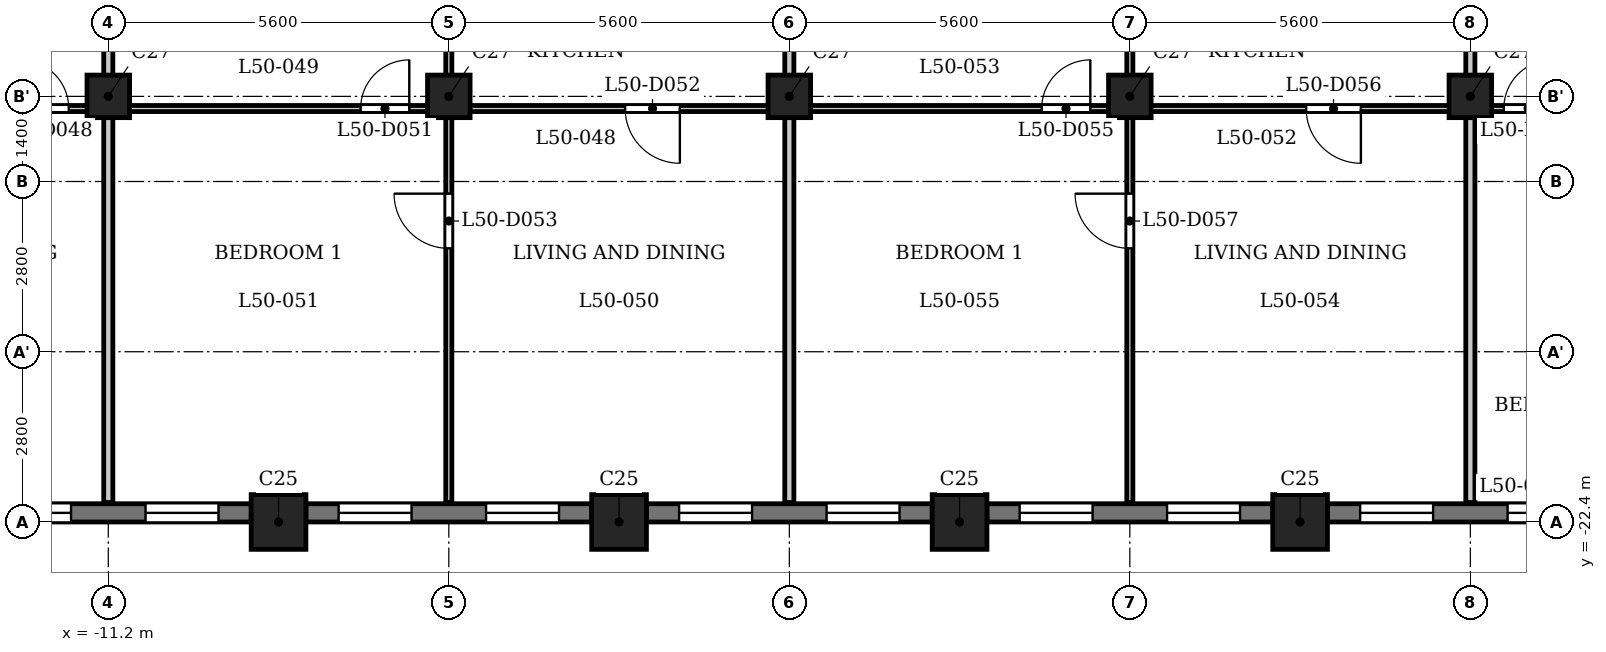
"""IFC4 building model, lengths in metres.
Left out: names, types, materials, properties, quantities, classifications, styles, units other than length and angle.
Written with IfcOpenShell. Run it as: python <this file> out.ifc"""

import sys

from ifc_helpers import new_model, si_unit, direction, frame, frame_2d, origin, origin_2d, place, context, subcontext, project, spatial, rectangle, extrude, element, fill, save


model = new_model("IFC4")
c1 = context("Model", 3, precision=1e-05, world=origin(), true_north=direction((0.0, 1.0)))
c2 = subcontext(c1, "Body", "Model", "MODEL_VIEW")
j1 = project(units=[si_unit("LENGTHUNIT", "METRE"), si_unit("PLANEANGLEUNIT", "RADIAN")], contexts=[c1])
p1 = place(None, origin())
s1 = spatial("IfcSite", under=j1, at=p1, CompositionType="ELEMENT")
p2 = place(p1, origin())
s2 = spatial("IfcBuilding", under=s1, at=p2, CompositionType="ELEMENT")
p3 = place(p2, frame((0.0, 0.0, 195.9)))
s3 = spatial("IfcBuildingStorey", under=s2, at=p3, CompositionType="ELEMENT", Elevation=195.9)
for number, where, z_axis, x_axis in (
    (1, (-8.4, -22.4, 0.0), (0.0, 0.0, 1.0), (1.0, 0.0, 0.0)),
    (2, (-2.8, -22.4, 0.0), (0.0, 0.0, 1.0), (1.0, 0.0, 0.0)),
    (3, (2.8, -22.4, 0.0), (0.0, 0.0, 1.0), (1.0, 0.0, 0.0)),
    (4, (8.4, -22.4, 0.0), (0.0, 0.0, 1.0), (1.0, 0.0, 0.0)),
):
    element("IfcColumn", number, at=place(p3, frame(where, z_axis=z_axis, x_axis=x_axis)), inside=s3, PredefinedType="COLUMN", context=c2, shape_type="SweptSolid", body=[
        extrude(rectangle(XDim=0.9, YDim=0.9, at=origin_2d()), origin(), (0.0, 0.0, 1.0), 3.5),
    ])
for number, where, z_axis, x_axis in (
    (5, (-11.2, -15.4, 0.0), (0.0, 0.0, 1.0), (1.0, 0.0, 0.0)),
    (6, (-5.6, -15.4, 0.0), (0.0, 0.0, 1.0), (1.0, 0.0, 0.0)),
    (7, (0.0, -15.4, 0.0), (0.0, 0.0, 1.0), (1.0, 0.0, 0.0)),
    (8, (5.6, -15.4, 0.0), (0.0, 0.0, 1.0), (1.0, 0.0, 0.0)),
    (9, (11.2, -15.4, 0.0), (0.0, 0.0, 1.0), (1.0, 0.0, 0.0)),
):
    element("IfcColumn", number, at=place(p3, frame(where, z_axis=z_axis, x_axis=x_axis)), inside=s3, PredefinedType="COLUMN", context=c2, shape_type="SweptSolid", body=[
        extrude(rectangle(XDim=0.7, YDim=0.7, at=origin_2d()), origin(), (0.0, 0.0, 1.0), 3.5),
    ])
p4 = place(p3, frame((-13.55, -22.25, 0.0), z_axis=(0.0, 0.0, 1.0), x_axis=(1.0, 0.0, 0.0)))
e10 = element("IfcWall", 10, at=p4, inside=s3, PredefinedType="SOLIDWALL", context=c2, shape_type="SweptSolid", body=[
    extrude(rectangle(XDim=4.7, YDim=0.3, at=frame_2d((2.35, 0.0))), origin(), (0.0, 0.0, 1.0), 2.5),
])
p5 = place(p4, frame((0.538, 0.0, 0.6)))
e11 = element("IfcOpeningElement", 11, at=p5, cuts=e10, PredefinedType="OPENING", context=c2, shape_type="SweptSolid", body=[
    extrude(rectangle(XDim=1.2, YDim=1.55, at=frame_2d((0.6, 0.775))), frame((0.0, 0.16, 0.0), z_axis=(0.0, -1.0, 0.0), x_axis=(1.0, 0.0, 0.0)), (0.0, 0.0, 1.0), 0.32),
])
p6 = place(p4, frame((2.962, 0.0, 0.6)))
e12 = element("IfcOpeningElement", 12, at=p6, cuts=e10, PredefinedType="OPENING", context=c2, shape_type="SweptSolid", body=[
    extrude(rectangle(XDim=1.2, YDim=1.55, at=frame_2d((0.6, 0.775))), frame((0.0, 0.16, 0.0), z_axis=(0.0, -1.0, 0.0), x_axis=(1.0, 0.0, 0.0)), (0.0, 0.0, 1.0), 0.32),
])
p7 = place(p3, frame((-7.95, -22.25, 0.0), z_axis=(0.0, 0.0, 1.0), x_axis=(1.0, 0.0, 0.0)))
e13 = element("IfcWall", 13, at=p7, inside=s3, PredefinedType="SOLIDWALL", context=c2, shape_type="SweptSolid", body=[
    extrude(rectangle(XDim=4.7, YDim=0.3, at=frame_2d((2.35, 0.0))), origin(), (0.0, 0.0, 1.0), 2.5),
])
p8 = place(p7, frame((0.538, 0.0, 0.6)))
e14 = element("IfcOpeningElement", 14, at=p8, cuts=e13, PredefinedType="OPENING", context=c2, shape_type="SweptSolid", body=[
    extrude(rectangle(XDim=1.2, YDim=1.55, at=frame_2d((0.6, 0.775))), frame((0.0, 0.16, 0.0), z_axis=(0.0, -1.0, 0.0), x_axis=(1.0, 0.0, 0.0)), (0.0, 0.0, 1.0), 0.32),
])
p9 = place(p7, frame((2.962, 0.0, 0.6)))
e15 = element("IfcOpeningElement", 15, at=p9, cuts=e13, PredefinedType="OPENING", context=c2, shape_type="SweptSolid", body=[
    extrude(rectangle(XDim=1.2, YDim=1.55, at=frame_2d((0.6, 0.775))), frame((0.0, 0.16, 0.0), z_axis=(0.0, -1.0, 0.0), x_axis=(1.0, 0.0, 0.0)), (0.0, 0.0, 1.0), 0.32),
])
p10 = place(p3, frame((-2.35, -22.25, 0.0), z_axis=(0.0, 0.0, 1.0), x_axis=(1.0, 0.0, 0.0)))
e16 = element("IfcWall", 16, at=p10, inside=s3, PredefinedType="SOLIDWALL", context=c2, shape_type="SweptSolid", body=[
    extrude(rectangle(XDim=4.7, YDim=0.3, at=frame_2d((2.35, 0.0))), origin(), (0.0, 0.0, 1.0), 2.5),
])
p11 = place(p10, frame((0.538, 0.0, 0.6)))
e17 = element("IfcOpeningElement", 17, at=p11, cuts=e16, PredefinedType="OPENING", context=c2, shape_type="SweptSolid", body=[
    extrude(rectangle(XDim=1.2, YDim=1.55, at=frame_2d((0.6, 0.775))), frame((0.0, 0.16, 0.0), z_axis=(0.0, -1.0, 0.0), x_axis=(1.0, 0.0, 0.0)), (0.0, 0.0, 1.0), 0.32),
])
p12 = place(p10, frame((2.962, 0.0, 0.6)))
e18 = element("IfcOpeningElement", 18, at=p12, cuts=e16, PredefinedType="OPENING", context=c2, shape_type="SweptSolid", body=[
    extrude(rectangle(XDim=1.2, YDim=1.55, at=frame_2d((0.6, 0.775))), frame((0.0, 0.16, 0.0), z_axis=(0.0, -1.0, 0.0), x_axis=(1.0, 0.0, 0.0)), (0.0, 0.0, 1.0), 0.32),
])
p13 = place(p3, frame((3.25, -22.25, 0.0), z_axis=(0.0, 0.0, 1.0), x_axis=(1.0, 0.0, 0.0)))
e19 = element("IfcWall", 19, at=p13, inside=s3, PredefinedType="SOLIDWALL", context=c2, shape_type="SweptSolid", body=[
    extrude(rectangle(XDim=4.7, YDim=0.3, at=frame_2d((2.35, 0.0))), origin(), (0.0, 0.0, 1.0), 2.5),
])
p14 = place(p13, frame((0.538, 0.0, 0.6)))
e20 = element("IfcOpeningElement", 20, at=p14, cuts=e19, PredefinedType="OPENING", context=c2, shape_type="SweptSolid", body=[
    extrude(rectangle(XDim=1.2, YDim=1.55, at=frame_2d((0.6, 0.775))), frame((0.0, 0.16, 0.0), z_axis=(0.0, -1.0, 0.0), x_axis=(1.0, 0.0, 0.0)), (0.0, 0.0, 1.0), 0.32),
])
p15 = place(p13, frame((2.962, 0.0, 0.6)))
e21 = element("IfcOpeningElement", 21, at=p15, cuts=e19, PredefinedType="OPENING", context=c2, shape_type="SweptSolid", body=[
    extrude(rectangle(XDim=1.2, YDim=1.55, at=frame_2d((0.6, 0.775))), frame((0.0, 0.16, 0.0), z_axis=(0.0, -1.0, 0.0), x_axis=(1.0, 0.0, 0.0)), (0.0, 0.0, 1.0), 0.32),
])
p16 = place(p3, frame((8.85, -22.25, 0.0), z_axis=(0.0, 0.0, 1.0), x_axis=(1.0, 0.0, 0.0)))
e22 = element("IfcWall", 22, at=p16, inside=s3, PredefinedType="SOLIDWALL", context=c2, shape_type="SweptSolid", body=[
    extrude(rectangle(XDim=4.7, YDim=0.3, at=frame_2d((2.35, 0.0))), origin(), (0.0, 0.0, 1.0), 2.5),
])
p17 = place(p16, frame((0.538, 0.0, 0.6)))
e23 = element("IfcOpeningElement", 23, at=p17, cuts=e22, PredefinedType="OPENING", context=c2, shape_type="SweptSolid", body=[
    extrude(rectangle(XDim=1.2, YDim=1.55, at=frame_2d((0.6, 0.775))), frame((0.0, 0.16, 0.0), z_axis=(0.0, -1.0, 0.0), x_axis=(1.0, 0.0, 0.0)), (0.0, 0.0, 1.0), 0.32),
])
p18 = place(p16, frame((2.962, 0.0, 0.6)))
e24 = element("IfcOpeningElement", 24, at=p18, cuts=e22, PredefinedType="OPENING", context=c2, shape_type="SweptSolid", body=[
    extrude(rectangle(XDim=1.2, YDim=1.55, at=frame_2d((0.6, 0.775))), frame((0.0, 0.16, 0.0), z_axis=(0.0, -1.0, 0.0), x_axis=(1.0, 0.0, 0.0)), (0.0, 0.0, 1.0), 0.32),
])
p19 = place(p3, frame((-16.725, -15.6, 0.0), z_axis=(0.0, 0.0, 1.0), x_axis=(1.0, 0.0, 0.0)))
e25 = element("IfcWall", 25, at=p19, inside=s3, PredefinedType="PARTITIONING", context=c2, shape_type="SweptSolid", body=[
    extrude(rectangle(XDim=33.45, YDim=0.1, at=frame_2d((16.725, 0.0))), origin(), (0.0, 0.0, 1.0), 3.2),
])
p20 = place(p19, frame((4.075, 0.0, 0.0)))
e26 = element("IfcOpeningElement", 26, at=p20, cuts=e25, PredefinedType="OPENING", context=c2, shape_type="SweptSolid", body=[
    extrude(rectangle(XDim=0.8, YDim=2.1, at=frame_2d((0.4, 1.05))), frame((0.0, 0.06, 0.0), z_axis=(0.0, -1.0, 0.0), x_axis=(1.0, 0.0, 0.0)), (0.0, 0.0, 1.0), 0.12),
])
p21 = place(p19, frame((1.825, 0.0, 0.0)))
e27 = element("IfcOpeningElement", 27, at=p21, cuts=e25, PredefinedType="OPENING", context=c2, shape_type="SweptSolid", body=[
    extrude(rectangle(XDim=0.9, YDim=2.1, at=frame_2d((0.45, 1.05))), frame((0.0, 0.06, 0.0), z_axis=(0.0, -1.0, 0.0), x_axis=(1.0, 0.0, 0.0)), (0.0, 0.0, 1.0), 0.12),
])
p22 = place(p19, frame((9.675, 0.0, 0.0)))
e28 = element("IfcOpeningElement", 28, at=p22, cuts=e25, PredefinedType="OPENING", context=c2, shape_type="SweptSolid", body=[
    extrude(rectangle(XDim=0.8, YDim=2.1, at=frame_2d((0.4, 1.05))), frame((0.0, 0.06, 0.0), z_axis=(0.0, -1.0, 0.0), x_axis=(1.0, 0.0, 0.0)), (0.0, 0.0, 1.0), 0.12),
])
p23 = place(p19, frame((14.025, 0.0, 0.0)))
e29 = element("IfcOpeningElement", 29, at=p23, cuts=e25, PredefinedType="OPENING", context=c2, shape_type="SweptSolid", body=[
    extrude(rectangle(XDim=0.9, YDim=2.1, at=frame_2d((0.45, 1.05))), frame((0.0, 0.06, 0.0), z_axis=(0.0, -1.0, 0.0), x_axis=(1.0, 0.0, 0.0)), (0.0, 0.0, 1.0), 0.12),
])
p24 = place(p19, frame((20.875, 0.0, 0.0)))
e30 = element("IfcOpeningElement", 30, at=p24, cuts=e25, PredefinedType="OPENING", context=c2, shape_type="SweptSolid", body=[
    extrude(rectangle(XDim=0.8, YDim=2.1, at=frame_2d((0.4, 1.05))), frame((0.0, 0.06, 0.0), z_axis=(0.0, -1.0, 0.0), x_axis=(1.0, 0.0, 0.0)), (0.0, 0.0, 1.0), 0.12),
])
p25 = place(p19, frame((25.225, 0.0, 0.0)))
e31 = element("IfcOpeningElement", 31, at=p25, cuts=e25, PredefinedType="OPENING", context=c2, shape_type="SweptSolid", body=[
    extrude(rectangle(XDim=0.9, YDim=2.1, at=frame_2d((0.45, 1.05))), frame((0.0, 0.06, 0.0), z_axis=(0.0, -1.0, 0.0), x_axis=(1.0, 0.0, 0.0)), (0.0, 0.0, 1.0), 0.12),
])
p26 = place(p19, frame((28.475, 0.0, 0.0)))
e32 = element("IfcOpeningElement", 32, at=p26, cuts=e25, PredefinedType="OPENING", context=c2, shape_type="SweptSolid", body=[
    extrude(rectangle(XDim=0.8, YDim=2.1, at=frame_2d((0.4, 1.05))), frame((0.0, 0.06, 0.0), z_axis=(0.0, -1.0, 0.0), x_axis=(1.0, 0.0, 0.0)), (0.0, 0.0, 1.0), 0.12),
])
p27 = place(p19, frame((30.675, 0.0, 0.0)))
e33 = element("IfcOpeningElement", 33, at=p27, cuts=e25, PredefinedType="OPENING", context=c2, shape_type="SweptSolid", body=[
    extrude(rectangle(XDim=0.9, YDim=2.1, at=frame_2d((0.45, 1.05))), frame((0.0, 0.06, 0.0), z_axis=(0.0, -1.0, 0.0), x_axis=(1.0, 0.0, 0.0)), (0.0, 0.0, 1.0), 0.12),
])
p28 = place(p3, frame((-11.2, -22.08, 0.0), z_axis=(0.0, 0.0, 1.0), x_axis=(0.0, 1.0, 0.0)))
e34 = element("IfcWall", 34, at=p28, inside=s3, PredefinedType="PARTITIONING", context=c2, shape_type="SweptSolid", body=[
    extrude(rectangle(XDim=6.43, YDim=0.15, at=frame_2d((3.215, 0.0))), origin(), (0.0, 0.0, 1.0), 3.2),
])
p29 = place(p3, frame((-11.2, -15.55, 0.0), z_axis=(0.0, 0.0, 1.0), x_axis=(0.0, 1.0, 0.0)))
e35 = element("IfcWall", 35, at=p29, inside=s3, PredefinedType="PARTITIONING", context=c2, shape_type="SweptSolid", body=[
    extrude(rectangle(XDim=2.275, YDim=0.15, at=frame_2d((1.138, 0.0))), origin(), (0.0, 0.0, 1.0), 3.2),
])
p30 = place(p3, frame((-5.6, -22.08, 0.0), z_axis=(0.0, 0.0, 1.0), x_axis=(0.0, 1.0, 0.0)))
e36 = element("IfcWall", 36, at=p30, inside=s3, PredefinedType="PARTITIONING", context=c2, shape_type="SweptSolid", body=[
    extrude(rectangle(XDim=6.43, YDim=0.1, at=frame_2d((3.215, 0.0))), origin(), (0.0, 0.0, 1.0), 3.2),
])
p31 = place(p30, frame((4.18, 0.0, 0.0)))
e37 = element("IfcOpeningElement", 37, at=p31, cuts=e36, PredefinedType="OPENING", context=c2, shape_type="SweptSolid", body=[
    extrude(rectangle(XDim=0.9, YDim=2.1, at=frame_2d((0.45, 1.05))), frame((0.0, 0.06, 0.0), z_axis=(0.0, -1.0, 0.0), x_axis=(1.0, 0.0, 0.0)), (0.0, 0.0, 1.0), 0.12),
])
p32 = place(p3, frame((-5.6, -15.55, 0.0), z_axis=(0.0, 0.0, 1.0), x_axis=(0.0, 1.0, 0.0)))
e38 = element("IfcWall", 38, at=p32, inside=s3, PredefinedType="PARTITIONING", context=c2, shape_type="SweptSolid", body=[
    extrude(rectangle(XDim=2.275, YDim=0.1, at=frame_2d((1.138, 0.0))), origin(), (0.0, 0.0, 1.0), 3.2),
])
p33 = place(p3, frame((0.0, -22.08, 0.0), z_axis=(0.0, 0.0, 1.0), x_axis=(0.0, 1.0, 0.0)))
e39 = element("IfcWall", 39, at=p33, inside=s3, PredefinedType="PARTITIONING", context=c2, shape_type="SweptSolid", body=[
    extrude(rectangle(XDim=6.43, YDim=0.15, at=frame_2d((3.215, 0.0))), origin(), (0.0, 0.0, 1.0), 3.2),
])
p34 = place(p3, frame((0.0, -15.55, 0.0), z_axis=(0.0, 0.0, 1.0), x_axis=(0.0, 1.0, 0.0)))
e40 = element("IfcWall", 40, at=p34, inside=s3, PredefinedType="PARTITIONING", context=c2, shape_type="SweptSolid", body=[
    extrude(rectangle(XDim=2.275, YDim=0.15, at=frame_2d((1.138, 0.0))), origin(), (0.0, 0.0, 1.0), 3.2),
])
p35 = place(p3, frame((5.6, -22.08, 0.0), z_axis=(0.0, 0.0, 1.0), x_axis=(0.0, 1.0, 0.0)))
e41 = element("IfcWall", 41, at=p35, inside=s3, PredefinedType="PARTITIONING", context=c2, shape_type="SweptSolid", body=[
    extrude(rectangle(XDim=6.43, YDim=0.1, at=frame_2d((3.215, 0.0))), origin(), (0.0, 0.0, 1.0), 3.2),
])
p36 = place(p35, frame((4.18, 0.0, 0.0)))
e42 = element("IfcOpeningElement", 42, at=p36, cuts=e41, PredefinedType="OPENING", context=c2, shape_type="SweptSolid", body=[
    extrude(rectangle(XDim=0.9, YDim=2.1, at=frame_2d((0.45, 1.05))), frame((0.0, 0.06, 0.0), z_axis=(0.0, -1.0, 0.0), x_axis=(1.0, 0.0, 0.0)), (0.0, 0.0, 1.0), 0.12),
])
p37 = place(p3, frame((5.6, -15.55, 0.0), z_axis=(0.0, 0.0, 1.0), x_axis=(0.0, 1.0, 0.0)))
e43 = element("IfcWall", 43, at=p37, inside=s3, PredefinedType="PARTITIONING", context=c2, shape_type="SweptSolid", body=[
    extrude(rectangle(XDim=2.275, YDim=0.1, at=frame_2d((1.138, 0.0))), origin(), (0.0, 0.0, 1.0), 3.2),
])
p38 = place(p3, frame((11.2, -22.08, 0.0), z_axis=(0.0, 0.0, 1.0), x_axis=(0.0, 1.0, 0.0)))
e44 = element("IfcWall", 44, at=p38, inside=s3, PredefinedType="PARTITIONING", context=c2, shape_type="SweptSolid", body=[
    extrude(rectangle(XDim=6.43, YDim=0.15, at=frame_2d((3.215, 0.0))), origin(), (0.0, 0.0, 1.0), 3.2),
])
p39 = place(p3, frame((11.2, -15.55, 0.0), z_axis=(0.0, 0.0, 1.0), x_axis=(0.0, 1.0, 0.0)))
e45 = element("IfcWall", 45, at=p39, inside=s3, PredefinedType="PARTITIONING", context=c2, shape_type="SweptSolid", body=[
    extrude(rectangle(XDim=2.275, YDim=0.15, at=frame_2d((1.138, 0.0))), origin(), (0.0, 0.0, 1.0), 3.2),
])
p40 = place(p20, origin())
e46 = element("IfcDoor", 46, at=p40, inside=s3, OperationType="SINGLE_SWING_RIGHT", PredefinedType="DOOR", context=c2, shape_type="SweptSolid", body=[
    extrude(rectangle(XDim=0.8, YDim=2.1, at=frame_2d((0.4, 1.05))), frame((0.0, 0.025, 0.0), z_axis=(0.0, -1.0, 0.0), x_axis=(1.0, 0.0, 0.0)), (0.0, 0.0, 1.0), 0.05),
])
fill(e26, e46)
p41 = place(p22, origin())
e47 = element("IfcDoor", 47, at=p41, inside=s3, OperationType="SINGLE_SWING_LEFT", PredefinedType="DOOR", context=c2, shape_type="SweptSolid", body=[
    extrude(rectangle(XDim=0.8, YDim=2.1, at=frame_2d((0.4, 1.05))), frame((0.0, 0.025, 0.0), z_axis=(0.0, -1.0, 0.0), x_axis=(1.0, 0.0, 0.0)), (0.0, 0.0, 1.0), 0.05),
])
fill(e28, e47)
p42 = place(p23, origin())
e48 = element("IfcDoor", 48, at=p42, inside=s3, OperationType="SINGLE_SWING_RIGHT", PredefinedType="DOOR", context=c2, shape_type="SweptSolid", body=[
    extrude(rectangle(XDim=0.9, YDim=2.1, at=frame_2d((0.45, 1.05))), frame((0.0, 0.025, 0.0), z_axis=(0.0, -1.0, 0.0), x_axis=(1.0, 0.0, 0.0)), (0.0, 0.0, 1.0), 0.05),
])
fill(e29, e48)
p43 = place(p31, origin())
e49 = element("IfcDoor", 49, at=p43, inside=s3, OperationType="SINGLE_SWING_LEFT", PredefinedType="DOOR", context=c2, shape_type="SweptSolid", body=[
    extrude(rectangle(XDim=0.9, YDim=2.1, at=frame_2d((0.45, 1.05))), frame((0.0, 0.025, 0.0), z_axis=(0.0, -1.0, 0.0), x_axis=(1.0, 0.0, 0.0)), (0.0, 0.0, 1.0), 0.05),
])
fill(e37, e49)
p44 = place(p24, origin())
e50 = element("IfcDoor", 50, at=p44, inside=s3, OperationType="SINGLE_SWING_LEFT", PredefinedType="DOOR", context=c2, shape_type="SweptSolid", body=[
    extrude(rectangle(XDim=0.8, YDim=2.1, at=frame_2d((0.4, 1.05))), frame((0.0, 0.025, 0.0), z_axis=(0.0, -1.0, 0.0), x_axis=(1.0, 0.0, 0.0)), (0.0, 0.0, 1.0), 0.05),
])
fill(e30, e50)
p45 = place(p25, origin())
e51 = element("IfcDoor", 51, at=p45, inside=s3, OperationType="SINGLE_SWING_RIGHT", PredefinedType="DOOR", context=c2, shape_type="SweptSolid", body=[
    extrude(rectangle(XDim=0.9, YDim=2.1, at=frame_2d((0.45, 1.05))), frame((0.0, 0.025, 0.0), z_axis=(0.0, -1.0, 0.0), x_axis=(1.0, 0.0, 0.0)), (0.0, 0.0, 1.0), 0.05),
])
fill(e31, e51)
p46 = place(p36, origin())
e52 = element("IfcDoor", 52, at=p46, inside=s3, OperationType="SINGLE_SWING_LEFT", PredefinedType="DOOR", context=c2, shape_type="SweptSolid", body=[
    extrude(rectangle(XDim=0.9, YDim=2.1, at=frame_2d((0.45, 1.05))), frame((0.0, 0.025, 0.0), z_axis=(0.0, -1.0, 0.0), x_axis=(1.0, 0.0, 0.0)), (0.0, 0.0, 1.0), 0.05),
])
fill(e42, e52)
p47 = place(p26, origin())
e53 = element("IfcDoor", 53, at=p47, inside=s3, OperationType="SINGLE_SWING_LEFT", PredefinedType="DOOR", context=c2, shape_type="SweptSolid", body=[
    extrude(rectangle(XDim=0.8, YDim=2.1, at=frame_2d((0.4, 1.05))), frame((0.0, 0.025, 0.0), z_axis=(0.0, -1.0, 0.0), x_axis=(1.0, 0.0, 0.0)), (0.0, 0.0, 1.0), 0.05),
])
fill(e32, e53)
p48 = place(p5, origin())
e54 = element("IfcWindow", 54, at=p48, inside=s3, PartitioningType="SINGLE_PANEL", PredefinedType="WINDOW", context=c2, shape_type="SweptSolid", body=[
    extrude(rectangle(XDim=1.2, YDim=1.55, at=frame_2d((0.6, 0.775))), frame((0.0, 0.03, 0.0), z_axis=(0.0, -1.0, 0.0), x_axis=(1.0, 0.0, 0.0)), (0.0, 0.0, 1.0), 0.06),
])
fill(e11, e54)
p49 = place(p6, origin())
e55 = element("IfcWindow", 55, at=p49, inside=s3, PartitioningType="SINGLE_PANEL", PredefinedType="WINDOW", context=c2, shape_type="SweptSolid", body=[
    extrude(rectangle(XDim=1.2, YDim=1.55, at=frame_2d((0.6, 0.775))), frame((0.0, 0.03, 0.0), z_axis=(0.0, -1.0, 0.0), x_axis=(1.0, 0.0, 0.0)), (0.0, 0.0, 1.0), 0.06),
])
fill(e12, e55)
p50 = place(p8, origin())
e56 = element("IfcWindow", 56, at=p50, inside=s3, PartitioningType="SINGLE_PANEL", PredefinedType="WINDOW", context=c2, shape_type="SweptSolid", body=[
    extrude(rectangle(XDim=1.2, YDim=1.55, at=frame_2d((0.6, 0.775))), frame((0.0, 0.03, 0.0), z_axis=(0.0, -1.0, 0.0), x_axis=(1.0, 0.0, 0.0)), (0.0, 0.0, 1.0), 0.06),
])
fill(e14, e56)
p51 = place(p9, origin())
e57 = element("IfcWindow", 57, at=p51, inside=s3, PartitioningType="SINGLE_PANEL", PredefinedType="WINDOW", context=c2, shape_type="SweptSolid", body=[
    extrude(rectangle(XDim=1.2, YDim=1.55, at=frame_2d((0.6, 0.775))), frame((0.0, 0.03, 0.0), z_axis=(0.0, -1.0, 0.0), x_axis=(1.0, 0.0, 0.0)), (0.0, 0.0, 1.0), 0.06),
])
fill(e15, e57)
p52 = place(p11, origin())
e58 = element("IfcWindow", 58, at=p52, inside=s3, PartitioningType="SINGLE_PANEL", PredefinedType="WINDOW", context=c2, shape_type="SweptSolid", body=[
    extrude(rectangle(XDim=1.2, YDim=1.55, at=frame_2d((0.6, 0.775))), frame((0.0, 0.03, 0.0), z_axis=(0.0, -1.0, 0.0), x_axis=(1.0, 0.0, 0.0)), (0.0, 0.0, 1.0), 0.06),
])
fill(e17, e58)
p53 = place(p12, origin())
e59 = element("IfcWindow", 59, at=p53, inside=s3, PartitioningType="SINGLE_PANEL", PredefinedType="WINDOW", context=c2, shape_type="SweptSolid", body=[
    extrude(rectangle(XDim=1.2, YDim=1.55, at=frame_2d((0.6, 0.775))), frame((0.0, 0.03, 0.0), z_axis=(0.0, -1.0, 0.0), x_axis=(1.0, 0.0, 0.0)), (0.0, 0.0, 1.0), 0.06),
])
fill(e18, e59)
p54 = place(p14, origin())
e60 = element("IfcWindow", 60, at=p54, inside=s3, PartitioningType="SINGLE_PANEL", PredefinedType="WINDOW", context=c2, shape_type="SweptSolid", body=[
    extrude(rectangle(XDim=1.2, YDim=1.55, at=frame_2d((0.6, 0.775))), frame((0.0, 0.03, 0.0), z_axis=(0.0, -1.0, 0.0), x_axis=(1.0, 0.0, 0.0)), (0.0, 0.0, 1.0), 0.06),
])
fill(e20, e60)
p55 = place(p15, origin())
e61 = element("IfcWindow", 61, at=p55, inside=s3, PartitioningType="SINGLE_PANEL", PredefinedType="WINDOW", context=c2, shape_type="SweptSolid", body=[
    extrude(rectangle(XDim=1.2, YDim=1.55, at=frame_2d((0.6, 0.775))), frame((0.0, 0.03, 0.0), z_axis=(0.0, -1.0, 0.0), x_axis=(1.0, 0.0, 0.0)), (0.0, 0.0, 1.0), 0.06),
])
fill(e21, e61)
p56 = place(p17, origin())
e62 = element("IfcWindow", 62, at=p56, inside=s3, PartitioningType="SINGLE_PANEL", PredefinedType="WINDOW", context=c2, shape_type="SweptSolid", body=[
    extrude(rectangle(XDim=1.2, YDim=1.55, at=frame_2d((0.6, 0.775))), frame((0.0, 0.03, 0.0), z_axis=(0.0, -1.0, 0.0), x_axis=(1.0, 0.0, 0.0)), (0.0, 0.0, 1.0), 0.06),
])
fill(e23, e62)
p57 = place(p18, origin())
e63 = element("IfcWindow", 63, at=p57, inside=s3, PartitioningType="SINGLE_PANEL", PredefinedType="WINDOW", context=c2, shape_type="SweptSolid", body=[
    extrude(rectangle(XDim=1.2, YDim=1.55, at=frame_2d((0.6, 0.775))), frame((0.0, 0.03, 0.0), z_axis=(0.0, -1.0, 0.0), x_axis=(1.0, 0.0, 0.0)), (0.0, 0.0, 1.0), 0.06),
])
fill(e24, e63)
save(model, sys.argv[1])
